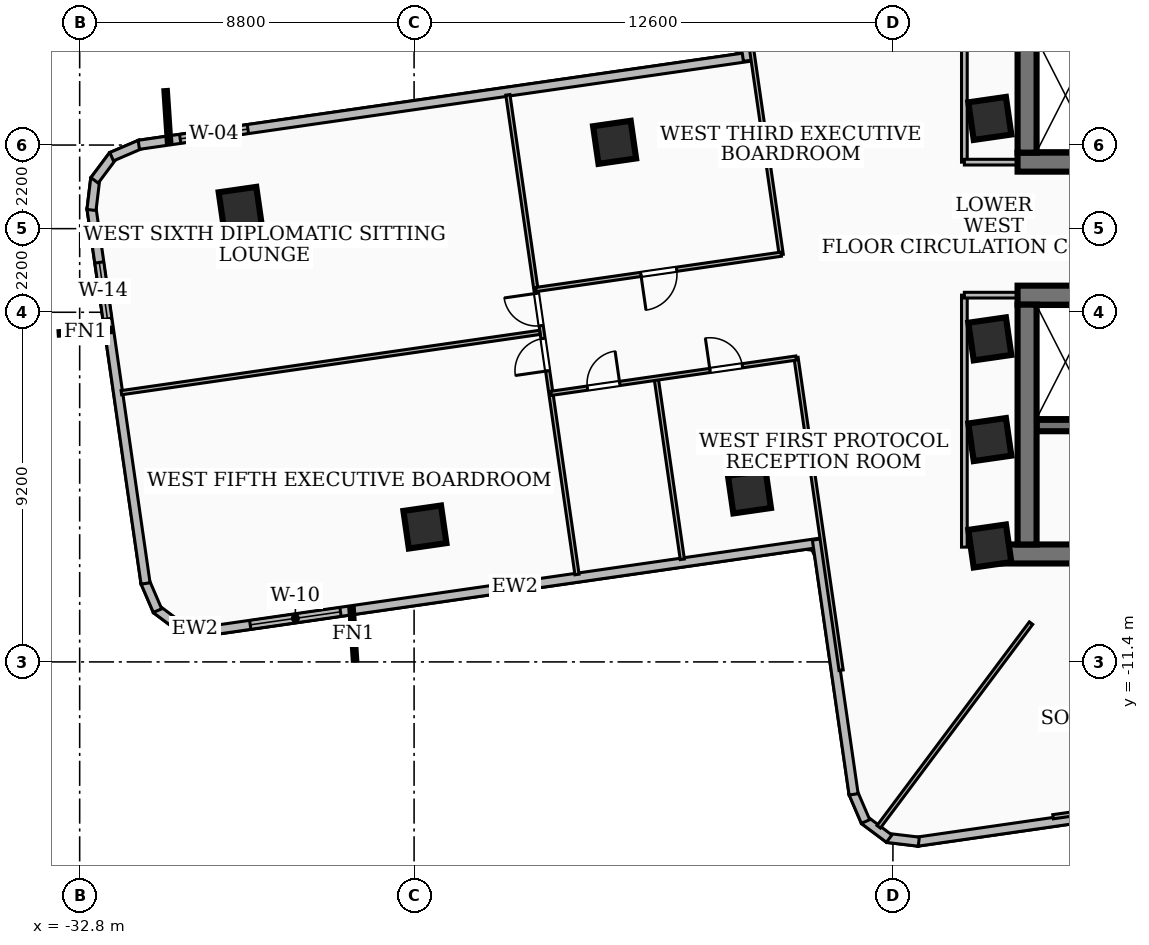
"""IFC4 building model, lengths in metres.
Left out: names, types, materials, properties, quantities, classifications, styles, units other than length and angle.
Written with IfcOpenShell. Run it as: python <this file> out.ifc"""

import sys

from ifc_helpers import new_model, si_unit, direction, frame, frame_2d, origin, origin_2d, place, context, subcontext, project, spatial, rectangle, extrude, element, fill, save


model = new_model("IFC4")
c1 = context("Model", 3, precision=1e-05, world=origin(), true_north=direction((0.0, 1.0)))
c2 = subcontext(c1, "Body", "Model", "MODEL_VIEW")
j1 = project(units=[si_unit("LENGTHUNIT", "METRE"), si_unit("PLANEANGLEUNIT", "RADIAN")], contexts=[c1])
p1 = place(None, origin())
s1 = spatial("IfcSite", under=j1, at=p1, CompositionType="ELEMENT")
p2 = place(p1, origin())
s2 = spatial("IfcBuilding", under=s1, at=p2, CompositionType="ELEMENT")
p3 = place(p2, frame((0.0, 0.0, 85.68)))
s3 = spatial("IfcBuildingStorey", under=s2, at=p3, CompositionType="ELEMENT", Elevation=85.68)
p4 = place(p3, frame((8.12, 1.75, 0.0), z_axis=(0.0, 0.0, 1.0), x_axis=(-1.0, 0.0, 0.0)))
e1 = element("IfcWall", 1, at=p4, inside=s3, PredefinedType="SHEAR", context=c2, shape_type="SweptSolid", body=[
    extrude(rectangle(XDim=16.24, YDim=0.5, at=frame_2d((8.12, 0.0))), origin(), (0.0, 0.0, 1.0), 3.34),
])
p5 = place(p4, frame((7.45, 0.0, 0.0)))
e2 = element("IfcOpeningElement", 2, at=p5, cuts=e1, PredefinedType="OPENING", context=c2, shape_type="SweptSolid", body=[
    extrude(rectangle(XDim=1.0, YDim=2.1, at=frame_2d((0.5, 1.05))), frame((0.0, 0.26, 0.0), z_axis=(0.0, -1.0, 0.0), x_axis=(1.0, 0.0, 0.0)), (0.0, 0.0, 1.0), 0.52),
])
p6 = place(p4, frame((3.4, 0.0, 0.0)))
e3 = element("IfcOpeningElement", 3, at=p6, cuts=e1, PredefinedType="OPENING", context=c2, shape_type="SweptSolid", body=[
    extrude(rectangle(XDim=0.9, YDim=2.06, at=frame_2d((0.45, 1.03))), frame((0.0, 0.26, 0.0), z_axis=(0.0, -1.0, 0.0), x_axis=(1.0, 0.0, 0.0)), (0.0, 0.0, 1.0), 0.52),
])
p7 = place(p4, frame((1.1, 0.0, 0.0)))
e4 = element("IfcOpeningElement", 4, at=p7, cuts=e1, PredefinedType="OPENING", context=c2, shape_type="SweptSolid", body=[
    extrude(rectangle(XDim=0.9, YDim=2.06, at=frame_2d((0.45, 1.03))), frame((0.0, 0.26, 0.0), z_axis=(0.0, -1.0, 0.0), x_axis=(1.0, 0.0, 0.0)), (0.0, 0.0, 1.0), 0.52),
])
p8 = place(p3, frame((-7.87, 2.0, 0.0), z_axis=(0.0, 0.0, 1.0), x_axis=(0.0, 1.0, 0.0)))
e5 = element("IfcWall", 5, at=p8, inside=s3, PredefinedType="SHEAR", context=c2, shape_type="SweptSolid", body=[
    extrude(rectangle(XDim=6.31, YDim=0.5, at=frame_2d((3.155, 0.0))), origin(), (0.0, 0.0, 1.0), 3.34),
])
p9 = place(p3, frame((8.78, -8.56, 0.0), z_axis=(0.0, 0.0, 1.0), x_axis=(-1.0, 0.0, 0.0)))
e6 = element("IfcWall", 6, at=p9, inside=s3, PredefinedType="SHEAR", context=c2, shape_type="SweptSolid", body=[
    extrude(rectangle(XDim=17.56, YDim=0.5, at=frame_2d((8.78, 0.0))), origin(), (0.0, 0.0, 1.0), 3.34),
])
p10 = place(p3, frame((-8.12, -1.75, 0.0), z_axis=(0.0, 0.0, 1.0), x_axis=(1.0, 0.0, 0.0)))
e7 = element("IfcWall", 7, at=p10, inside=s3, PredefinedType="SHEAR", context=c2, shape_type="SweptSolid", body=[
    extrude(rectangle(XDim=16.24, YDim=0.5, at=frame_2d((8.12, 0.0))), origin(), (0.0, 0.0, 1.0), 3.34),
])
p11 = place(p10, frame((7.45, 0.0, 0.0)))
e8 = element("IfcOpeningElement", 8, at=p11, cuts=e7, PredefinedType="OPENING", context=c2, shape_type="SweptSolid", body=[
    extrude(rectangle(XDim=1.0, YDim=2.1, at=frame_2d((0.5, 1.05))), frame((0.0, 0.26, 0.0), z_axis=(0.0, -1.0, 0.0), x_axis=(1.0, 0.0, 0.0)), (0.0, 0.0, 1.0), 0.52),
])
p12 = place(p10, frame((10.965, 0.0, 0.0)))
e9 = element("IfcOpeningElement", 9, at=p12, cuts=e7, PredefinedType="OPENING", context=c2, shape_type="SweptSolid", body=[
    extrude(rectangle(XDim=1.05, YDim=2.15, at=frame_2d((0.525, 1.075))), frame((0.0, 0.26, 0.0), z_axis=(0.0, -1.0, 0.0), x_axis=(1.0, 0.0, 0.0)), (0.0, 0.0, 1.0), 0.52),
])
p13 = place(p10, frame((12.525, 0.0, 0.0)))
e10 = element("IfcOpeningElement", 10, at=p13, cuts=e7, PredefinedType="OPENING", context=c2, shape_type="SweptSolid", body=[
    extrude(rectangle(XDim=1.05, YDim=2.15, at=frame_2d((0.525, 1.075))), frame((0.0, 0.26, 0.0), z_axis=(0.0, -1.0, 0.0), x_axis=(1.0, 0.0, 0.0)), (0.0, 0.0, 1.0), 0.52),
])
p14 = place(p10, frame((14.085, 0.0, 0.0)))
e11 = element("IfcOpeningElement", 11, at=p14, cuts=e7, PredefinedType="OPENING", context=c2, shape_type="SweptSolid", body=[
    extrude(rectangle(XDim=1.05, YDim=2.15, at=frame_2d((0.525, 1.075))), frame((0.0, 0.26, 0.0), z_axis=(0.0, -1.0, 0.0), x_axis=(1.0, 0.0, 0.0)), (0.0, 0.0, 1.0), 0.52),
])
p15 = place(p3, frame((-7.87, -8.31, 0.0), z_axis=(0.0, 0.0, 1.0), x_axis=(0.0, 1.0, 0.0)))
e12 = element("IfcWall", 12, at=p15, inside=s3, PredefinedType="SHEAR", context=c2, shape_type="SweptSolid", body=[
    extrude(rectangle(XDim=6.31, YDim=0.5, at=frame_2d((3.155, 0.0))), origin(), (0.0, 0.0, 1.0), 3.34),
])
p16 = place(p3, frame((-7.62, -5.18, 0.0), z_axis=(0.0, 0.0, 1.0), x_axis=(1.0, 0.0, 0.0)))
e13 = element("IfcWall", 13, at=p16, inside=s3, PredefinedType="SOLIDWALL", context=c2, shape_type="SweptSolid", body=[
    extrude(rectangle(XDim=15.24, YDim=0.3, at=frame_2d((7.62, 0.0))), origin(), (0.0, 0.0, 1.0), 3.34),
])
p17 = place(p16, frame((5.77, 0.0, 0.0)))
e14 = element("IfcOpeningElement", 14, at=p17, cuts=e13, PredefinedType="OPENING", context=c2, shape_type="SweptSolid", body=[
    extrude(rectangle(XDim=1.1, YDim=2.15, at=frame_2d((0.55, 1.075))), frame((0.0, 0.16, 0.0), z_axis=(0.0, -1.0, 0.0), x_axis=(1.0, 0.0, 0.0)), (0.0, 0.0, 1.0), 0.32),
])
p18 = place(p16, frame((7.97, 0.0, 0.0)))
e15 = element("IfcOpeningElement", 15, at=p18, cuts=e13, PredefinedType="OPENING", context=c2, shape_type="SweptSolid", body=[
    extrude(rectangle(XDim=1.0, YDim=2.1, at=frame_2d((0.5, 1.05))), frame((0.0, 0.16, 0.0), z_axis=(0.0, -1.0, 0.0), x_axis=(1.0, 0.0, 0.0)), (0.0, 0.0, 1.0), 0.32),
])
for number, where, z_axis, x_axis in (
    (16, (-8.85, -5.55, 0.0), (0.0, 0.0, 1.0), (0.99, 0.143, 0.0)),
    (17, (-8.85, -2.9, 0.0), (0.0, 0.0, 1.0), (0.99, 0.143, 0.0)),
    (18, (-8.85, 2.9, 0.0), (0.0, 0.0, 1.0), (0.99, 0.143, 0.0)),
    (19, (-8.85, -8.35, 0.0), (0.0, 0.0, 1.0), (0.99, 0.143, 0.0)),
    (20, (-18.724, 2.271, 0.0), (0.0, 0.0, 1.0), (0.99, 0.143, 0.0)),
    (21, (-15.175, -6.927, 0.0), (0.0, 0.0, 1.0), (0.99, 0.143, 0.0)),
    (22, (-28.576, 0.533, 0.0), (0.0, 0.0, 1.0), (0.99, 0.143, 0.0)),
    (23, (-23.715, -7.851, 0.0), (0.0, 0.0, 1.0), (0.99, 0.143, 0.0)),
):
    element("IfcColumn", number, at=place(p3, frame(where, z_axis=z_axis, x_axis=x_axis)), inside=s3, PredefinedType="COLUMN", context=c2, shape_type="SweptSolid", body=[
        extrude(rectangle(XDim=1.0, YDim=1.0, at=origin_2d()), origin(), (0.0, 0.0, 1.0), 3.6),
    ])
p19 = place(p3, frame((-13.292, -8.26, 0.0), z_axis=(0.0, 0.0, 1.0), x_axis=(-0.989770197797, -0.142670794326, 0.0)))
e24 = element("IfcWall", 24, at=p19, inside=s3, PredefinedType="SOLIDWALL", context=c2, shape_type="SweptSolid", body=[
    extrude(rectangle(XDim=16.275, YDim=0.24, at=frame_2d((8.138, 0.0))), origin(), (0.0, 0.0, 1.0), 3.34),
])
p20 = place(p19, frame((12.775, 0.0, 0.85)))
e25 = element("IfcOpeningElement", 25, at=p20, cuts=e24, PredefinedType="OPENING", context=c2, shape_type="SweptSolid", body=[
    extrude(rectangle(XDim=2.4, YDim=1.65, at=frame_2d((1.2, 0.825))), frame((0.0, 0.13, 0.0), z_axis=(0.0, -1.0, 0.0), x_axis=(1.0, 0.0, 0.0)), (0.0, 0.0, 1.0), 0.26),
])
p21 = place(p3, frame((-29.351, -10.581, 0.0), z_axis=(0.0, 0.0, 1.0), x_axis=(-0.992997305963, 0.118136998224, 0.0)))
e26 = element("IfcWall", 26, at=p21, inside=s3, PredefinedType="SOLIDWALL", context=c2, shape_type="SweptSolid", body=[
    extrude(rectangle(XDim=0.831, YDim=0.24, at=frame_2d((0.416, 0.0))), origin(), (0.0, 0.0, 1.0), 3.34),
])
p22 = place(p3, frame((-30.131, -10.501, 0.0), z_axis=(0.0, 0.0, 1.0), x_axis=(-0.800072018724, 0.599903963027, 0.0)))
e27 = element("IfcWall", 27, at=p22, inside=s3, PredefinedType="SOLIDWALL", context=c2, shape_type="SweptSolid", body=[
    extrude(rectangle(XDim=0.813, YDim=0.24, at=frame_2d((0.407, 0.0))), origin(), (0.0, 0.0, 1.0), 3.34),
])
p23 = place(p3, frame((-30.752, -10.051, 0.0), z_axis=(0.0, 0.0, 1.0), x_axis=(-0.395089773053, 0.91864251547, 0.0)))
e28 = element("IfcWall", 28, at=p23, inside=s3, PredefinedType="SOLIDWALL", context=c2, shape_type="SweptSolid", body=[
    extrude(rectangle(XDim=0.831, YDim=0.24, at=frame_2d((0.415, 0.0))), origin(), (0.0, 0.0, 1.0), 3.34),
])
p24 = place(p3, frame((-31.066, -9.336, 0.0), z_axis=(0.0, 0.0, 1.0), x_axis=(-0.142705661552, 0.98976517122, 0.0)))
e29 = element("IfcWall", 29, at=p24, inside=s3, PredefinedType="SOLIDWALL", context=c2, shape_type="SweptSolid", body=[
    extrude(rectangle(XDim=9.979, YDim=0.24, at=frame_2d((4.99, 0.0))), origin(), (0.0, 0.0, 1.0), 3.34),
])
p25 = place(p24, frame((7.034, 0.0, 0.85)))
e30 = element("IfcOpeningElement", 30, at=p25, cuts=e29, PredefinedType="OPENING", context=c2, shape_type="SweptSolid", body=[
    extrude(rectangle(XDim=1.5, YDim=1.5, at=frame_2d((0.75, 0.75))), frame((0.0, 0.13, 0.0), z_axis=(0.0, -1.0, 0.0), x_axis=(1.0, 0.0, 0.0)), (0.0, 0.0, 1.0), 0.26),
])
p26 = place(p3, frame((-32.489, 0.491, 0.0), z_axis=(0.0, 0.0, 1.0), x_axis=(0.119295842971, 0.992858752215, 0.0)))
e31 = element("IfcWall", 31, at=p26, inside=s3, PredefinedType="SOLIDWALL", context=c2, shape_type="SweptSolid", body=[
    extrude(rectangle(XDim=0.831, YDim=0.24, at=frame_2d((0.416, 0.0))), origin(), (0.0, 0.0, 1.0), 3.34),
])
p27 = place(p3, frame((-32.408, 1.271, 0.0), z_axis=(0.0, 0.0, 1.0), x_axis=(0.598415049045, 0.801186263659, 0.0)))
e32 = element("IfcWall", 32, at=p27, inside=s3, PredefinedType="SOLIDWALL", context=c2, shape_type="SweptSolid", body=[
    extrude(rectangle(XDim=0.814, YDim=0.24, at=frame_2d((0.407, 0.0))), origin(), (0.0, 0.0, 1.0), 3.34),
])
p28 = place(p3, frame((-31.959, 1.893, 0.0), z_axis=(0.0, 0.0, 1.0), x_axis=(0.919175455153, 0.393848299024, 0.0)))
e33 = element("IfcWall", 33, at=p28, inside=s3, PredefinedType="SOLIDWALL", context=c2, shape_type="SweptSolid", body=[
    extrude(rectangle(XDim=0.83, YDim=0.24, at=frame_2d((0.415, 0.0))), origin(), (0.0, 0.0, 1.0), 3.34),
])
p29 = place(p3, frame((-31.244, 2.206, 0.0), z_axis=(0.0, 0.0, 1.0), x_axis=(0.989771419035, 0.142662321802, 0.0)))
e34 = element("IfcWall", 34, at=p29, inside=s3, PredefinedType="SOLIDWALL", context=c2, shape_type="SweptSolid", body=[
    extrude(rectangle(XDim=16.276, YDim=0.24, at=frame_2d((8.138, 0.0))), origin(), (0.0, 0.0, 1.0), 3.34),
])
p30 = place(p29, frame((1.1, 0.0, 0.85)))
e35 = element("IfcOpeningElement", 35, at=p30, cuts=e34, PredefinedType="OPENING", context=c2, shape_type="SweptSolid", body=[
    extrude(rectangle(XDim=1.8, YDim=2.0, at=frame_2d((0.9, 1.0))), frame((0.0, 0.13, 0.0), z_axis=(0.0, -1.0, 0.0), x_axis=(1.0, 0.0, 0.0)), (0.0, 0.0, 1.0), 0.26),
])
p31 = place(p3, frame((-15.215, 4.419, 0.0), z_axis=(0.0, 0.0, 1.0), x_axis=(-0.14277438433, 0.989755260243, 0.0)))
e36 = element("IfcWall", 36, at=p31, inside=s3, PredefinedType="SOLIDWALL", context=c2, shape_type="SweptSolid", body=[
    extrude(rectangle(XDim=6.416, YDim=0.24, at=frame_2d((3.208, 0.0))), origin(), (0.0, 0.0, 1.0), 3.34),
])
p32 = place(p3, frame((-4.419, -15.215, 0.0), z_axis=(0.0, 0.0, 1.0), x_axis=(-0.989755260243, -0.14277438433, 0.0)))
e37 = element("IfcWall", 37, at=p32, inside=s3, PredefinedType="SOLIDWALL", context=c2, shape_type="SweptSolid", body=[
    extrude(rectangle(XDim=6.416, YDim=0.24, at=frame_2d((3.208, 0.0))), origin(), (0.0, 0.0, 1.0), 2.486),
])
p33 = place(p3, frame((-10.719, -16.13, 0.0), z_axis=(0.0, 0.0, 1.0), x_axis=(-0.993031739051, 0.117847211411, 0.0)))
e38 = element("IfcWall", 38, at=p33, inside=s3, PredefinedType="SOLIDWALL", context=c2, shape_type="SweptSolid", body=[
    extrude(rectangle(XDim=0.831, YDim=0.24, at=frame_2d((0.416, 0.0))), origin(), (0.0, 0.0, 1.0), 3.34),
])
p34 = place(p3, frame((-11.499, -16.05, 0.0), z_axis=(0.0, 0.0, 1.0), x_axis=(-0.800072018724, 0.599903963027, 0.0)))
e39 = element("IfcWall", 39, at=p34, inside=s3, PredefinedType="SOLIDWALL", context=c2, shape_type="SweptSolid", body=[
    extrude(rectangle(XDim=0.813, YDim=0.24, at=frame_2d((0.407, 0.0))), origin(), (0.0, 0.0, 1.0), 3.34),
])
p35 = place(p3, frame((-12.12, -15.6, 0.0), z_axis=(0.0, 0.0, 1.0), x_axis=(-0.394735025731, 0.918795004047, 0.0)))
e40 = element("IfcWall", 40, at=p35, inside=s3, PredefinedType="SOLIDWALL", context=c2, shape_type="SweptSolid", body=[
    extrude(rectangle(XDim=0.831, YDim=0.24, at=frame_2d((0.415, 0.0))), origin(), (0.0, 0.0, 1.0), 3.34),
])
p36 = place(p3, frame((-12.434, -14.885, 0.0), z_axis=(0.0, 0.0, 1.0), x_axis=(-0.142692500085, 0.989767068769, 0.0)))
e41 = element("IfcWall", 41, at=p36, inside=s3, PredefinedType="SOLIDWALL", context=c2, shape_type="SweptSolid", body=[
    extrude(rectangle(XDim=6.775, YDim=0.24, at=frame_2d((3.388, 0.0))), origin(), (0.0, 0.0, 1.0), 3.34),
])
p37 = place(p3, frame((-9.52, 1.75, 0.0), z_axis=(0.0, 0.0, 1.0), x_axis=(0.0, 1.0, 0.0)))
e42 = element("IfcWall", 42, at=p37, inside=s3, PredefinedType="PARTITIONING", context=c2, shape_type="SweptSolid", body=[
    extrude(rectangle(XDim=6.63, YDim=0.15, at=frame_2d((3.315, 0.0))), origin(), (0.0, 0.0, 1.0), 2.486),
])
p38 = place(p3, frame((-7.85, 1.75, 0.0), z_axis=(0.0, 0.0, 1.0), x_axis=(-1.0, 0.0, 0.0)))
e43 = element("IfcWall", 43, at=p38, inside=s3, PredefinedType="PARTITIONING", context=c2, shape_type="SweptSolid", body=[
    extrude(rectangle(XDim=1.67, YDim=0.15, at=frame_2d((0.835, 0.0))), origin(), (0.0, 0.0, 1.0), 2.405),
])
p39 = place(p3, frame((-9.52, -8.38, 0.0), z_axis=(0.0, 0.0, 1.0), x_axis=(0.0, 1.0, 0.0)))
e44 = element("IfcWall", 44, at=p39, inside=s3, PredefinedType="PARTITIONING", context=c2, shape_type="SweptSolid", body=[
    extrude(rectangle(XDim=6.63, YDim=0.15, at=frame_2d((3.315, 0.0))), origin(), (0.0, 0.0, 1.0), 2.486),
])
p40 = place(p3, frame((-7.85, -1.75, 0.0), z_axis=(0.0, 0.0, 1.0), x_axis=(-1.0, 0.0, 0.0)))
e45 = element("IfcWall", 45, at=p40, inside=s3, PredefinedType="PARTITIONING", context=c2, shape_type="SweptSolid", body=[
    extrude(rectangle(XDim=1.67, YDim=0.15, at=frame_2d((0.835, 0.0))), origin(), (0.0, 0.0, 1.0), 2.405),
])
p41 = place(p3, frame((-7.766, -10.38, 0.0), z_axis=(0.0, 0.0, 1.0), x_axis=(-0.598966195252, -0.800774310867, 0.0)))
e46 = element("IfcWall", 46, at=p41, inside=s3, PredefinedType="PARTITIONING", context=c2, shape_type="SweptSolid", body=[
    extrude(rectangle(XDim=6.691, YDim=0.11, at=frame_2d((3.346, 0.0))), origin(), (0.0, 0.0, 1.0), 3.34),
])
p42 = place(p3, frame((-13.949, -3.394, 0.0), z_axis=(0.0, 0.0, 1.0), x_axis=(0.142725091033, -0.989762369657, 0.0)))
e47 = element("IfcWall", 47, at=p42, inside=s3, PredefinedType="PARTITIONING", context=c2, shape_type="SweptSolid", body=[
    extrude(rectangle(XDim=8.31, YDim=0.11, at=frame_2d((4.155, 0.0))), origin(), (0.0, 0.0, 1.0), 2.486),
])
p43 = place(p3, frame((-15.474, 7.186, 0.0), z_axis=(0.0, 0.0, 1.0), x_axis=(0.142779920322, -0.989754461648, 0.0)))
e48 = element("IfcWall", 48, at=p43, inside=s3, PredefinedType="PARTITIONING", context=c2, shape_type="SweptSolid", body=[
    extrude(rectangle(XDim=7.949, YDim=0.11, at=frame_2d((3.975, 0.0))), origin(), (0.0, 0.0, 1.0), 2.486),
])
p44 = place(p3, frame((-17.626, -3.954, 0.0), z_axis=(0.0, 0.0, 1.0), x_axis=(0.142668704072, -0.989770499095, 0.0)))
e49 = element("IfcWall", 49, at=p44, inside=s3, PredefinedType="PARTITIONING", context=c2, shape_type="SweptSolid", body=[
    extrude(rectangle(XDim=4.795, YDim=0.11, at=frame_2d((2.397, 0.0))), origin(), (0.0, 0.0, 1.0), 2.486),
])
p45 = place(p3, frame((-20.4, -4.334, 0.0), z_axis=(0.0, 0.0, 1.0), x_axis=(0.989774990044, 0.142637544439, 0.0)))
e50 = element("IfcWall", 50, at=p45, inside=s3, PredefinedType="PARTITIONING", context=c2, shape_type="SweptSolid", body=[
    extrude(rectangle(XDim=6.52, YDim=0.11, at=frame_2d((3.26, 0.0))), origin(), (0.0, 0.0, 1.0), 3.34),
])
p46 = place(p45, frame((4.23, 0.0, 0.0)))
e51 = element("IfcOpeningElement", 51, at=p46, cuts=e50, PredefinedType="OPENING", context=c2, shape_type="SweptSolid", body=[
    extrude(rectangle(XDim=0.86, YDim=2.04, at=frame_2d((0.43, 1.02))), frame((0.0, 0.065, 0.0), z_axis=(0.0, -1.0, 0.0), x_axis=(1.0, 0.0, 0.0)), (0.0, 0.0, 1.0), 0.13),
])
p47 = place(p45, frame((0.97, 0.0, 0.0)))
e52 = element("IfcOpeningElement", 52, at=p47, cuts=e50, PredefinedType="OPENING", context=c2, shape_type="SweptSolid", body=[
    extrude(rectangle(XDim=0.86, YDim=2.04, at=frame_2d((0.43, 1.02))), frame((0.0, 0.065, 0.0), z_axis=(0.0, -1.0, 0.0), x_axis=(1.0, 0.0, 0.0)), (0.0, 0.0, 1.0), 0.13),
])
p48 = place(p3, frame((-14.341, -0.672, 0.0), z_axis=(0.0, 0.0, 1.0), x_axis=(-0.989774990044, -0.142637544439, 0.0)))
e53 = element("IfcWall", 53, at=p48, inside=s3, PredefinedType="PARTITIONING", context=c2, shape_type="SweptSolid", body=[
    extrude(rectangle(XDim=6.52, YDim=0.11, at=frame_2d((3.26, 0.0))), origin(), (0.0, 0.0, 1.0), 3.34),
])
p49 = place(p48, frame((2.78, 0.0, 0.0)))
e54 = element("IfcOpeningElement", 54, at=p49, cuts=e53, PredefinedType="OPENING", context=c2, shape_type="SweptSolid", body=[
    extrude(rectangle(XDim=0.95, YDim=2.08, at=frame_2d((0.475, 1.04))), frame((0.0, 0.065, 0.0), z_axis=(0.0, -1.0, 0.0), x_axis=(1.0, 0.0, 0.0)), (0.0, 0.0, 1.0), 0.13),
])
p50 = place(p3, frame((-20.692, -2.729, 0.0), z_axis=(0.0, 0.0, 1.0), x_axis=(-0.989773607841, -0.14264713534, 0.0)))
e55 = element("IfcWall", 55, at=p50, inside=s3, PredefinedType="PARTITIONING", context=c2, shape_type="SweptSolid", body=[
    extrude(rectangle(XDim=11.125, YDim=0.11, at=frame_2d((5.562, 0.0))), origin(), (0.0, 0.0, 1.0), 2.832),
])
p51 = place(p3, frame((-19.713, -9.1, 0.0), z_axis=(0.0, 0.0, 1.0), x_axis=(-0.142667743944, 0.98977063749, 0.0)))
e56 = element("IfcWall", 56, at=p51, inside=s3, PredefinedType="PARTITIONING", context=c2, shape_type="SweptSolid", body=[
    extrude(rectangle(XDim=12.75, YDim=0.11, at=frame_2d((6.375, 0.0))), origin(), (0.0, 0.0, 1.0), 2.486),
])
p52 = place(p51, frame((6.615, 0.0, 0.0)))
e57 = element("IfcOpeningElement", 57, at=p52, cuts=e56, PredefinedType="OPENING", context=c2, shape_type="SweptSolid", body=[
    extrude(rectangle(XDim=0.86, YDim=2.04, at=frame_2d((0.43, 1.02))), frame((0.0, 0.065, 0.0), z_axis=(0.0, -1.0, 0.0), x_axis=(1.0, 0.0, 0.0)), (0.0, 0.0, 1.0), 0.13),
])
p53 = place(p51, frame((5.414, 0.0, 0.0)))
e58 = element("IfcOpeningElement", 58, at=p53, cuts=e56, PredefinedType="OPENING", context=c2, shape_type="SweptSolid", body=[
    extrude(rectangle(XDim=0.86, YDim=2.04, at=frame_2d((0.43, 1.02))), frame((0.0, 0.065, 0.0), z_axis=(0.0, -1.0, 0.0), x_axis=(1.0, 0.0, 0.0)), (0.0, 0.0, 1.0), 0.13),
])
p54 = place(p3, frame((-7.186, -15.474, 0.0), z_axis=(0.0, 0.0, 1.0), x_axis=(0.989754461648, 0.142779920322, 0.0)))
e59 = element("IfcWall", 59, at=p54, inside=s3, PredefinedType="PARTITIONING", context=c2, shape_type="SweptSolid", body=[
    extrude(rectangle(XDim=7.949, YDim=0.11, at=frame_2d((3.975, 0.0))), origin(), (0.0, 0.0, 1.0), 2.486),
])
p55 = place(p20, origin())
e60 = element("IfcWindow", 60, at=p55, inside=s3, PartitioningType="SINGLE_PANEL", PredefinedType="WINDOW", context=c2, shape_type="SweptSolid", body=[
    extrude(rectangle(XDim=2.4, YDim=1.65, at=frame_2d((1.2, 0.825))), frame((0.0, 0.03, 0.0), z_axis=(0.0, -1.0, 0.0), x_axis=(1.0, 0.0, 0.0)), (0.0, 0.0, 1.0), 0.06),
])
fill(e25, e60)
p56 = place(p25, origin())
e61 = element("IfcWindow", 61, at=p56, inside=s3, PartitioningType="SINGLE_PANEL", PredefinedType="WINDOW", context=c2, shape_type="SweptSolid", body=[
    extrude(rectangle(XDim=1.5, YDim=1.5, at=frame_2d((0.75, 0.75))), frame((0.0, 0.03, 0.0), z_axis=(0.0, -1.0, 0.0), x_axis=(1.0, 0.0, 0.0)), (0.0, 0.0, 1.0), 0.06),
])
fill(e30, e61)
p57 = place(p30, origin())
e62 = element("IfcWindow", 62, at=p57, inside=s3, PartitioningType="SINGLE_PANEL", PredefinedType="WINDOW", context=c2, shape_type="SweptSolid", body=[
    extrude(rectangle(XDim=1.8, YDim=2.0, at=frame_2d((0.9, 1.0))), frame((0.0, 0.03, 0.0), z_axis=(0.0, -1.0, 0.0), x_axis=(1.0, 0.0, 0.0)), (0.0, 0.0, 1.0), 0.06),
])
fill(e35, e62)
p58 = place(p46, origin())
e63 = element("IfcDoor", 63, at=p58, inside=s3, OperationType="SINGLE_SWING_LEFT", PredefinedType="DOOR", context=c2, shape_type="SweptSolid", body=[
    extrude(rectangle(XDim=0.86, YDim=2.04, at=frame_2d((0.43, 1.02))), frame((0.0, 0.025, 0.0), z_axis=(0.0, -1.0, 0.0), x_axis=(1.0, 0.0, 0.0)), (0.0, 0.0, 1.0), 0.05),
])
fill(e51, e63)
p59 = place(p47, origin())
e64 = element("IfcDoor", 64, at=p59, inside=s3, OperationType="SINGLE_SWING_RIGHT", PredefinedType="DOOR", context=c2, shape_type="SweptSolid", body=[
    extrude(rectangle(XDim=0.86, YDim=2.04, at=frame_2d((0.43, 1.02))), frame((0.0, 0.025, 0.0), z_axis=(0.0, -1.0, 0.0), x_axis=(1.0, 0.0, 0.0)), (0.0, 0.0, 1.0), 0.05),
])
fill(e52, e64)
p60 = place(p49, origin())
e65 = element("IfcDoor", 65, at=p60, inside=s3, OperationType="SINGLE_SWING_RIGHT", PredefinedType="DOOR", context=c2, shape_type="SweptSolid", body=[
    extrude(rectangle(XDim=0.95, YDim=2.08, at=frame_2d((0.475, 1.04))), frame((0.0, 0.025, 0.0), z_axis=(0.0, -1.0, 0.0), x_axis=(1.0, 0.0, 0.0)), (0.0, 0.0, 1.0), 0.05),
])
fill(e54, e65)
p61 = place(p52, origin())
e66 = element("IfcDoor", 66, at=p61, inside=s3, OperationType="SINGLE_SWING_RIGHT", PredefinedType="DOOR", context=c2, shape_type="SweptSolid", body=[
    extrude(rectangle(XDim=0.86, YDim=2.04, at=frame_2d((0.43, 1.02))), frame((0.0, 0.025, 0.0), z_axis=(0.0, -1.0, 0.0), x_axis=(1.0, 0.0, 0.0)), (0.0, 0.0, 1.0), 0.05),
])
fill(e57, e66)
p62 = place(p53, origin())
e67 = element("IfcDoor", 67, at=p62, inside=s3, OperationType="SINGLE_SWING_LEFT", PredefinedType="DOOR", context=c2, shape_type="SweptSolid", body=[
    extrude(rectangle(XDim=0.86, YDim=2.04, at=frame_2d((0.43, 1.02))), frame((0.0, 0.025, 0.0), z_axis=(0.0, -1.0, 0.0), x_axis=(1.0, 0.0, 0.0)), (0.0, 0.0, 1.0), 0.05),
])
fill(e58, e67)
save(model, sys.argv[1])
